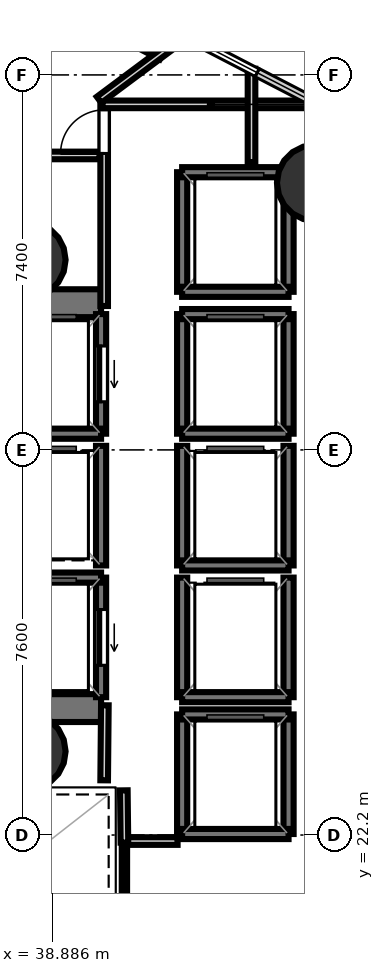
"""IFC4 building model, lengths in metres.
Left out: names, types, materials, properties, quantities, classifications, styles, units other than length and angle.
Written with IfcOpenShell. Run it as: python <this file> out.ifc"""

import sys

from ifc_helpers import new_model, si_unit, direction, frame, frame_2d, origin, origin_2d, place, context, subcontext, project, spatial, rectangle, hollow_circle, extrude, element, fill, save


model = new_model("IFC4")
c1 = context("Model", 3, precision=1e-05, world=origin(), true_north=direction((0.0, 1.0)))
c2 = subcontext(c1, "Body", "Model", "MODEL_VIEW")
j1 = project(units=[si_unit("LENGTHUNIT", "METRE"), si_unit("PLANEANGLEUNIT", "RADIAN")], contexts=[c1])
p1 = place(None, origin())
s1 = spatial("IfcSite", under=j1, at=p1, CompositionType="ELEMENT")
p2 = place(p1, origin())
s2 = spatial("IfcBuilding", under=s1, at=p2, CompositionType="ELEMENT")
p3 = place(p2, frame((0.0, 0.0, 131.1)))
s3 = spatial("IfcBuildingStorey", under=s2, at=p3, CompositionType="ELEMENT", Elevation=131.1)
p4 = place(p3, frame((29.23, 32.695, 0.0), z_axis=(0.0, 0.0, 1.0), x_axis=(1.0, 0.0, 0.0)))
e1 = element("IfcWall", 1, at=p4, inside=s3, PredefinedType="SHEAR", context=c2, shape_type="SweptSolid", body=[
    extrude(rectangle(XDim=10.62, YDim=0.55, at=frame_2d((5.31, 0.0))), origin(), (0.0, 0.0, 1.0), 3.52),
])
p5 = place(p4, frame((0.995, 0.0, 0.0)))
e2 = element("IfcOpeningElement", 2, at=p5, cuts=e1, PredefinedType="OPENING", context=c2, shape_type="SweptSolid", body=[
    extrude(rectangle(XDim=1.25, YDim=2.15, at=frame_2d((0.625, 1.075))), frame((0.0, 0.285, 0.0), z_axis=(0.0, -1.0, 0.0), x_axis=(1.0, 0.0, 0.0)), (0.0, 0.0, 1.0), 0.57),
])
p6 = place(p3, frame((29.23, 24.705, 0.0), z_axis=(0.0, 0.0, 1.0), x_axis=(1.0, 0.0, 0.0)))
e3 = element("IfcWall", 3, at=p6, inside=s3, PredefinedType="SHEAR", context=c2, shape_type="SweptSolid", body=[
    extrude(rectangle(XDim=10.62, YDim=0.55, at=frame_2d((5.31, 0.0))), origin(), (0.0, 0.0, 1.0), 3.52),
])
p7 = place(p6, frame((0.795, 0.0, 0.0)))
e4 = element("IfcOpeningElement", 4, at=p7, cuts=e3, PredefinedType="OPENING", context=c2, shape_type="SweptSolid", body=[
    extrude(rectangle(XDim=1.25, YDim=2.15, at=frame_2d((0.625, 1.075))), frame((0.0, 0.285, 0.0), z_axis=(0.0, -1.0, 0.0), x_axis=(1.0, 0.0, 0.0)), (0.0, 0.0, 1.0), 0.57),
])
for number, where, z_axis, x_axis in (
    (5, (38.4, 33.55, 0.0), (0.0, 0.0, 1.0), (1.0, 0.0, 0.0)),
    (6, (38.4, 23.85, 0.0), (0.0, 0.0, 1.0), (1.0, 0.0, 0.0)),
    (7, (44.071, 35.07, 0.0), (0.0, 0.0, 1.0), (1.0, 0.0, 0.0)),
):
    element("IfcColumn", number, at=place(p3, frame(where, z_axis=z_axis, x_axis=x_axis)), inside=s3, PredefinedType="COLUMN", context=c2, shape_type="SweptSolid", body=[
        extrude(hollow_circle(Radius=0.75, WallThickness=0.036, at=origin_2d()), origin(), (0.0, 0.0, 1.0), 3.7),
    ])
p8 = place(p3, frame((39.85, 30.12, 0.0), z_axis=(0.0, 0.0, 1.0), x_axis=(0.0, 1.0, 0.0)))
e8 = element("IfcWall", 8, at=p8, inside=s3, PredefinedType="SOLIDWALL", context=c2, shape_type="SweptSolid", body=[
    extrude(rectangle(XDim=2.36, YDim=0.2, at=frame_2d((1.18, 0.0))), origin(), (0.0, 0.0, 1.0), 3.52),
])
p9 = place(p8, frame((0.63, 0.0, 0.0)))
e9 = element("IfcOpeningElement", 9, at=p9, cuts=e8, PredefinedType="OPENING", context=c2, shape_type="SweptSolid", body=[
    extrude(rectangle(XDim=1.1, YDim=2.15, at=frame_2d((0.55, 1.075))), frame((0.0, 0.11, 0.0), z_axis=(0.0, -1.0, 0.0), x_axis=(1.0, 0.0, 0.0)), (0.0, 0.0, 1.0), 0.22),
])
p10 = place(p3, frame((37.75, 30.12, 0.0), z_axis=(0.0, 0.0, 1.0), x_axis=(1.0, 0.0, 0.0)))
e10 = element("IfcWall", 10, at=p10, inside=s3, PredefinedType="SOLIDWALL", context=c2, shape_type="SweptSolid", body=[
    extrude(rectangle(XDim=2.1, YDim=0.2, at=frame_2d((1.05, 0.0))), origin(), (0.0, 0.0, 1.0), 3.52),
])
p11 = place(p3, frame((39.85, 24.92, 0.0), z_axis=(0.0, 0.0, 1.0), x_axis=(0.0, 1.0, 0.0)))
e11 = element("IfcWall", 11, at=p11, inside=s3, PredefinedType="SOLIDWALL", context=c2, shape_type="SweptSolid", body=[
    extrude(rectangle(XDim=2.36, YDim=0.2, at=frame_2d((1.18, 0.0))), origin(), (0.0, 0.0, 1.0), 3.52),
])
p12 = place(p11, frame((0.63, 0.0, 0.0)))
e12 = element("IfcOpeningElement", 12, at=p12, cuts=e11, PredefinedType="OPENING", context=c2, shape_type="SweptSolid", body=[
    extrude(rectangle(XDim=1.1, YDim=2.15, at=frame_2d((0.55, 1.075))), frame((0.0, 0.11, 0.0), z_axis=(0.0, -1.0, 0.0), x_axis=(1.0, 0.0, 0.0)), (0.0, 0.0, 1.0), 0.22),
])
p13 = place(p3, frame((37.75, 27.28, 0.0), z_axis=(0.0, 0.0, 1.0), x_axis=(1.0, 0.0, 0.0)))
e13 = element("IfcWall", 13, at=p13, inside=s3, PredefinedType="SOLIDWALL", context=c2, shape_type="SweptSolid", body=[
    extrude(rectangle(XDim=2.1, YDim=0.2, at=frame_2d((1.05, 0.0))), origin(), (0.0, 0.0, 1.0), 3.52),
])
for number, where, z_axis, x_axis in (
    (14, (43.55, 30.12, 0.0), (0.0, 0.0, 1.0), (0.0, 1.0, 0.0)),
    (15, (41.45, 30.12, 0.0), (0.0, 0.0, 1.0), (0.0, 1.0, 0.0)),
):
    element("IfcWall", number, at=place(p3, frame(where, z_axis=z_axis, x_axis=x_axis)), inside=s3, PredefinedType="SOLIDWALL", context=c2, shape_type="SweptSolid", body=[
        extrude(rectangle(XDim=2.36, YDim=0.2, at=frame_2d((1.18, 0.0))), origin(), (0.0, 0.0, 1.0), 3.52),
    ])
for number, where, z_axis, x_axis in (
    (16, (41.45, 32.48, 0.0), (0.0, 0.0, 1.0), (1.0, 0.0, 0.0)),
    (17, (41.45, 30.12, 0.0), (0.0, 0.0, 1.0), (1.0, 0.0, 0.0)),
):
    element("IfcWall", number, at=place(p3, frame(where, z_axis=z_axis, x_axis=x_axis)), inside=s3, PredefinedType="SOLIDWALL", context=c2, shape_type="SweptSolid", body=[
        extrude(rectangle(XDim=2.1, YDim=0.2, at=frame_2d((1.05, 0.0))), origin(), (0.0, 0.0, 1.0), 3.52),
    ])
for number, where, z_axis, x_axis in (
    (18, (43.55, 27.52, 0.0), (0.0, 0.0, 1.0), (0.0, 1.0, 0.0)),
    (19, (41.45, 27.52, 0.0), (0.0, 0.0, 1.0), (0.0, 1.0, 0.0)),
):
    element("IfcWall", number, at=place(p3, frame(where, z_axis=z_axis, x_axis=x_axis)), inside=s3, PredefinedType="SOLIDWALL", context=c2, shape_type="SweptSolid", body=[
        extrude(rectangle(XDim=2.36, YDim=0.2, at=frame_2d((1.18, 0.0))), origin(), (0.0, 0.0, 1.0), 3.52),
    ])
p14 = place(p3, frame((41.45, 27.52, 0.0), z_axis=(0.0, 0.0, 1.0), x_axis=(1.0, 0.0, 0.0)))
e20 = element("IfcWall", 20, at=p14, inside=s3, PredefinedType="SOLIDWALL", context=c2, shape_type="SweptSolid", body=[
    extrude(rectangle(XDim=2.1, YDim=0.2, at=frame_2d((1.05, 0.0))), origin(), (0.0, 0.0, 1.0), 3.52),
])
for number, where, z_axis, x_axis in (
    (21, (43.55, 24.92, 0.0), (0.0, 0.0, 1.0), (0.0, 1.0, 0.0)),
    (22, (41.45, 24.92, 0.0), (0.0, 0.0, 1.0), (0.0, 1.0, 0.0)),
):
    element("IfcWall", number, at=place(p3, frame(where, z_axis=z_axis, x_axis=x_axis)), inside=s3, PredefinedType="SOLIDWALL", context=c2, shape_type="SweptSolid", body=[
        extrude(rectangle(XDim=2.36, YDim=0.2, at=frame_2d((1.18, 0.0))), origin(), (0.0, 0.0, 1.0), 3.52),
    ])
p15 = place(p3, frame((41.45, 24.92, 0.0), z_axis=(0.0, 0.0, 1.0), x_axis=(1.0, 0.0, 0.0)))
e23 = element("IfcWall", 23, at=p15, inside=s3, PredefinedType="SOLIDWALL", context=c2, shape_type="SweptSolid", body=[
    extrude(rectangle(XDim=2.1, YDim=0.2, at=frame_2d((1.05, 0.0))), origin(), (0.0, 0.0, 1.0), 3.52),
])
p16 = place(p3, frame((39.85, 27.52, 0.0), z_axis=(0.0, 0.0, 1.0), x_axis=(0.0, 1.0, 0.0)))
e24 = element("IfcWall", 24, at=p16, inside=s3, PredefinedType="SOLIDWALL", context=c2, shape_type="SweptSolid", body=[
    extrude(rectangle(XDim=2.36, YDim=0.2, at=frame_2d((1.18, 0.0))), origin(), (0.0, 0.0, 1.0), 3.52),
])
for number, where, z_axis, x_axis in (
    (25, (43.55, 22.22, 0.0), (0.0, 0.0, 1.0), (0.0, 1.0, 0.0)),
    (26, (41.45, 22.22, 0.0), (0.0, 0.0, 1.0), (0.0, 1.0, 0.0)),
):
    element("IfcWall", number, at=place(p3, frame(where, z_axis=z_axis, x_axis=x_axis)), inside=s3, PredefinedType="SOLIDWALL", context=c2, shape_type="SweptSolid", body=[
        extrude(rectangle(XDim=2.36, YDim=0.2, at=frame_2d((1.18, 0.0))), origin(), (0.0, 0.0, 1.0), 3.52),
    ])
for number, where, z_axis, x_axis in (
    (27, (41.45, 24.58, 0.0), (0.0, 0.0, 1.0), (1.0, 0.0, 0.0)),
    (28, (41.45, 22.22, 0.0), (0.0, 0.0, 1.0), (1.0, 0.0, 0.0)),
):
    element("IfcWall", number, at=place(p3, frame(where, z_axis=z_axis, x_axis=x_axis)), inside=s3, PredefinedType="SOLIDWALL", context=c2, shape_type="SweptSolid", body=[
        extrude(rectangle(XDim=2.1, YDim=0.2, at=frame_2d((1.05, 0.0))), origin(), (0.0, 0.0, 1.0), 3.52),
    ])
for number, where, z_axis, x_axis in (
    (29, (43.55, 32.92, 0.0), (0.0, 0.0, 1.0), (0.0, 1.0, 0.0)),
    (30, (41.45, 32.92, 0.0), (0.0, 0.0, 1.0), (0.0, 1.0, 0.0)),
):
    element("IfcWall", number, at=place(p3, frame(where, z_axis=z_axis, x_axis=x_axis)), inside=s3, PredefinedType="SOLIDWALL", context=c2, shape_type="SweptSolid", body=[
        extrude(rectangle(XDim=2.36, YDim=0.2, at=frame_2d((1.18, 0.0))), origin(), (0.0, 0.0, 1.0), 3.52),
    ])
for number, where, z_axis, x_axis in (
    (31, (41.45, 35.28, 0.0), (0.0, 0.0, 1.0), (1.0, 0.0, 0.0)),
    (32, (41.45, 32.92, 0.0), (0.0, 0.0, 1.0), (1.0, 0.0, 0.0)),
):
    element("IfcWall", number, at=place(p3, frame(where, z_axis=z_axis, x_axis=x_axis)), inside=s3, PredefinedType="SOLIDWALL", context=c2, shape_type="SweptSolid", body=[
        extrude(rectangle(XDim=2.1, YDim=0.2, at=frame_2d((1.05, 0.0))), origin(), (0.0, 0.0, 1.0), 3.52),
    ])
p17 = place(p3, frame((39.911, 32.64, 0.0), z_axis=(0.0, 0.0, 1.0), x_axis=(0.0, 1.0, 0.0)))
e33 = element("IfcWall", 33, at=p17, inside=s3, PredefinedType="PARTITIONING", context=c2, shape_type="SweptSolid", body=[
    extrude(rectangle(XDim=4.01, YDim=0.15, at=frame_2d((2.005, 0.0))), origin(), (0.0, 0.0, 1.0), 2.84),
])
p18 = place(p17, frame((3.01, 0.0, 0.0)))
e34 = element("IfcOpeningElement", 34, at=p18, cuts=e33, PredefinedType="OPENING", context=c2, shape_type="SweptSolid", body=[
    extrude(rectangle(XDim=0.86, YDim=2.05, at=frame_2d((0.43, 1.025))), frame((0.0, 0.085, 0.0), z_axis=(0.0, -1.0, 0.0), x_axis=(1.0, 0.0, 0.0)), (0.0, 0.0, 1.0), 0.17),
])
p19 = place(p3, frame((39.88, 36.619, 0.0), z_axis=(0.0, 0.0, 1.0), x_axis=(1.0, 0.0, 0.0)))
e35 = element("IfcWall", 35, at=p19, inside=s3, PredefinedType="PARTITIONING", context=c2, shape_type="SweptSolid", body=[
    extrude(rectangle(XDim=4.278, YDim=0.15, at=frame_2d((2.139, 0.0))), origin(), (0.0, 0.0, 1.0), 2.84),
])
p20 = place(p3, frame((42.819, 37.322, 0.0), z_axis=(0.0, 0.0, 1.0), x_axis=(0.0, -1.0, 0.0)))
e36 = element("IfcWall", 36, at=p20, inside=s3, PredefinedType="PARTITIONING", context=c2, shape_type="SweptSolid", body=[
    extrude(rectangle(XDim=1.842, YDim=0.15, at=frame_2d((0.921, 0.0))), origin(), (0.0, 0.0, 1.0), 2.84),
])
p21 = place(p3, frame((41.36, 22.081, 0.0), z_axis=(0.0, 0.0, 1.0), x_axis=(-1.0, 0.0, 0.0)))
e37 = element("IfcWall", 37, at=p21, inside=s3, PredefinedType="PARTITIONING", context=c2, shape_type="SweptSolid", body=[
    extrude(rectangle(XDim=1.08, YDim=0.15, at=frame_2d((0.54, 0.0))), origin(), (0.0, 0.0, 1.0), 2.84),
])
p22 = place(p3, frame((40.311, 22.05, 0.0), z_axis=(0.0, 0.0, 1.0), x_axis=(-0.011836292006, 0.999929948642, 0.0)))
e38 = element("IfcWall", 38, at=p22, inside=s3, PredefinedType="PARTITIONING", context=c2, shape_type="SweptSolid", body=[
    extrude(rectangle(XDim=1.031, YDim=0.15, at=frame_2d((0.516, 0.0))), origin(), (0.0, 0.0, 1.0), 2.84),
])
p23 = place(p3, frame((39.911, 23.28, 0.0), z_axis=(0.0, 0.0, 1.0), x_axis=(0.009397771291, 0.999955839972, 0.0)))
e39 = element("IfcWall", 39, at=p23, inside=s3, PredefinedType="PARTITIONING", context=c2, shape_type="SweptSolid", body=[
    extrude(rectangle(XDim=1.481, YDim=0.15, at=frame_2d((0.74, 0.0))), origin(), (0.0, 0.0, 1.0), 2.84),
])
p24 = place(p3, frame((39.405, 38.423, 0.0), z_axis=(0.0, 0.0, 1.0), x_axis=(0.887824590753, -0.460182024915, 0.0)))
e40 = element("IfcWall", 40, at=p24, inside=s3, PredefinedType="PARTITIONING", context=c2, shape_type="SweptSolid", body=[
    extrude(rectangle(XDim=1.846, YDim=0.15, at=frame_2d((0.923, 0.0))), origin(), (0.0, 0.0, 1.0), 2.84),
])
p25 = place(p3, frame((41.529, 37.991, 0.0), z_axis=(0.0, 0.0, 1.0), x_axis=(-0.801813304709, -0.597574618262, 0.0)))
e41 = element("IfcWall", 41, at=p25, inside=s3, PredefinedType="PARTITIONING", context=c2, shape_type="SweptSolid", body=[
    extrude(rectangle(XDim=2.145, YDim=0.15, at=frame_2d((1.072, 0.0))), origin(), (0.0, 0.0, 1.0), 2.84),
])
p26 = place(p3, frame((39.818, 35.611, 0.0), z_axis=(0.0, 0.0, 1.0), x_axis=(-1.0, 0.0, 0.0)))
e42 = element("IfcWall", 42, at=p26, inside=s3, PredefinedType="PARTITIONING", context=c2, shape_type="SweptSolid", body=[
    extrude(rectangle(XDim=2.768, YDim=0.15, at=frame_2d((1.384, 0.0))), origin(), (0.0, 0.0, 1.0), 2.84),
])
p27 = place(p3, frame((40.31, 17.972, 0.0), z_axis=(0.0, 0.0, 1.0), x_axis=(0.000305362145, 0.999999953377, 0.0)))
e43 = element("IfcWall", 43, at=p27, inside=s3, PredefinedType="PARTITIONING", context=c2, shape_type="SweptSolid", body=[
    extrude(rectangle(XDim=3.998, YDim=0.105, at=frame_2d((1.999, 0.0))), origin(), (0.0, 0.0, 1.0), 2.84),
])
p28 = place(p3, frame((57.7, 21.101, 0.0), z_axis=(0.0, 0.0, 1.0), x_axis=(-0.93160913768, -0.363461709939, 0.0)))
e44 = element("IfcWall", 44, at=p28, inside=s3, PredefinedType="PARTITIONING", context=c2, shape_type="SweptSolid", body=[
    extrude(rectangle(XDim=31.413, YDim=0.14, at=frame_2d((15.706, 0.0))), origin(), (0.0, 0.0, 1.0), 2.84),
])
p29 = place(p9, origin())
e45 = element("IfcDoor", 45, at=p29, inside=s3, OperationType="SLIDING_TO_LEFT", PredefinedType="DOOR", context=c2, shape_type="SweptSolid", body=[
    extrude(rectangle(XDim=1.1, YDim=2.15, at=frame_2d((0.55, 1.075))), frame((0.0, 0.025, 0.0), z_axis=(0.0, -1.0, 0.0), x_axis=(1.0, 0.0, 0.0)), (0.0, 0.0, 1.0), 0.05),
])
fill(e9, e45)
p30 = place(p12, origin())
e46 = element("IfcDoor", 46, at=p30, inside=s3, OperationType="SLIDING_TO_LEFT", PredefinedType="DOOR", context=c2, shape_type="SweptSolid", body=[
    extrude(rectangle(XDim=1.1, YDim=2.15, at=frame_2d((0.55, 1.075))), frame((0.0, 0.025, 0.0), z_axis=(0.0, -1.0, 0.0), x_axis=(1.0, 0.0, 0.0)), (0.0, 0.0, 1.0), 0.05),
])
fill(e12, e46)
p31 = place(p18, origin())
e47 = element("IfcDoor", 47, at=p31, inside=s3, OperationType="SINGLE_SWING_LEFT", PredefinedType="DOOR", context=c2, shape_type="SweptSolid", body=[
    extrude(rectangle(XDim=0.86, YDim=2.05, at=frame_2d((0.43, 1.025))), frame((0.0, 0.025, 0.0), z_axis=(0.0, -1.0, 0.0), x_axis=(1.0, 0.0, 0.0)), (0.0, 0.0, 1.0), 0.05),
])
fill(e34, e47)
save(model, sys.argv[1])
